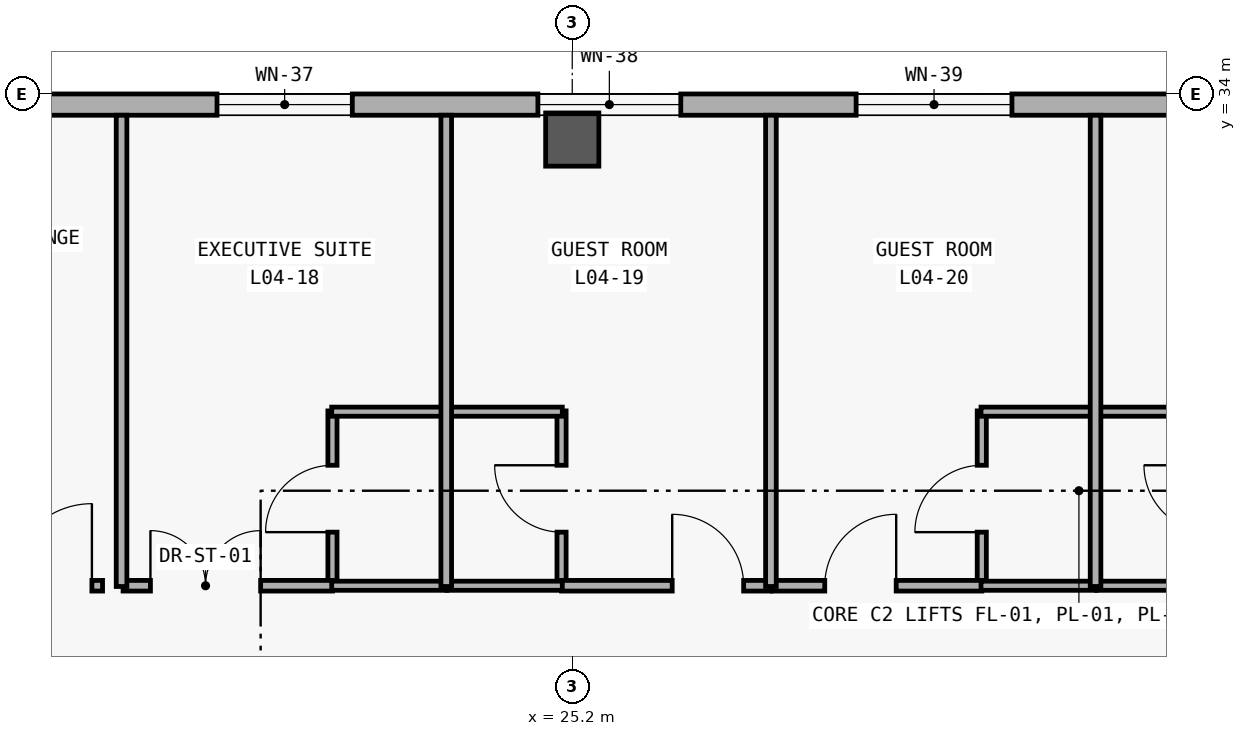
"""IFC4 building model, lengths in metres.
Left out: names, types, materials, properties, quantities, classifications, styles, units other than length and angle.
Written with IfcOpenShell. Run it as: python <this file> out.ifc"""

import sys

from ifc_helpers import new_model, si_unit, direction, frame, frame_2d, origin, origin_2d, place, context, subcontext, project, spatial, rectangle, extrude, element, fill, save


model = new_model("IFC4")
c1 = context("Model", 3, precision=1e-05, world=origin(), true_north=direction((0.0, 1.0)))
c2 = subcontext(c1, "Body", "Model", "MODEL_VIEW")
j1 = project(units=[si_unit("LENGTHUNIT", "METRE"), si_unit("PLANEANGLEUNIT", "RADIAN")], contexts=[c1])
p1 = place(None, origin())
s1 = spatial("IfcSite", under=j1, at=p1, CompositionType="ELEMENT")
p2 = place(p1, origin())
s2 = spatial("IfcBuilding", under=s1, at=p2, CompositionType="ELEMENT")
p3 = place(p2, frame((0.0, 0.0, 19.2)))
s3 = spatial("IfcBuildingStorey", under=s2, at=p3, CompositionType="ELEMENT", Elevation=19.2)
p4 = place(p3, frame((25.2, 33.4, 0.0), z_axis=(0.0, 0.0, 1.0), x_axis=(1.0, 0.0, 0.0)))
e1 = element("IfcColumn", 1, at=p4, inside=s3, PredefinedType="COLUMN", context=c2, shape_type="SweptSolid", body=[
    extrude(rectangle(XDim=0.7, YDim=0.7, at=origin_2d()), origin(), (0.0, 0.0, 1.0), 3.6),
])
p5 = place(p3, frame((8.68, 33.86, 0.0), z_axis=(0.0, 0.0, 1.0), x_axis=(1.0, 0.0, 0.0)))
e2 = element("IfcWall", 2, at=p5, inside=s3, PredefinedType="SOLIDWALL", context=c2, shape_type="SweptSolid", body=[
    extrude(rectangle(XDim=83.44, YDim=0.28, at=frame_2d((41.72, 0.0))), origin(), (0.0, 0.0, 1.0), 3.32),
])
p6 = place(p5, frame((4.745, 0.0, 0.85)))
e3 = element("IfcOpeningElement", 3, at=p6, cuts=e2, PredefinedType="OPENING", context=c2, shape_type="SweptSolid", body=[
    extrude(rectangle(XDim=1.25, YDim=1.45, at=frame_2d((0.625, 0.725))), frame((0.0, 0.15, 0.0), z_axis=(0.0, -1.0, 0.0), x_axis=(1.0, 0.0, 0.0)), (0.0, 0.0, 1.0), 0.3),
])
p7 = place(p5, frame((11.846, 0.0, 0.85)))
e4 = element("IfcOpeningElement", 4, at=p7, cuts=e2, PredefinedType="OPENING", context=c2, shape_type="SweptSolid", body=[
    extrude(rectangle(XDim=1.78, YDim=1.95, at=frame_2d((0.89, 0.975))), frame((0.0, 0.15, 0.0), z_axis=(0.0, -1.0, 0.0), x_axis=(1.0, 0.0, 0.0)), (0.0, 0.0, 1.0), 0.3),
])
p8 = place(p5, frame((16.068, 0.0, 0.85)))
e5 = element("IfcOpeningElement", 5, at=p8, cuts=e2, PredefinedType="OPENING", context=c2, shape_type="SweptSolid", body=[
    extrude(rectangle(XDim=1.88, YDim=1.95, at=frame_2d((0.94, 0.975))), frame((0.0, 0.15, 0.0), z_axis=(0.0, -1.0, 0.0), x_axis=(1.0, 0.0, 0.0)), (0.0, 0.0, 1.0), 0.3),
])
p9 = place(p5, frame((20.255, 0.0, 0.85)))
e6 = element("IfcOpeningElement", 6, at=p9, cuts=e2, PredefinedType="OPENING", context=c2, shape_type="SweptSolid", body=[
    extrude(rectangle(XDim=2.05, YDim=1.95, at=frame_2d((1.025, 0.975))), frame((0.0, 0.15, 0.0), z_axis=(0.0, -1.0, 0.0), x_axis=(1.0, 0.0, 0.0)), (0.0, 0.0, 1.0), 0.3),
])
p10 = place(p5, frame((24.461, 0.0, 0.85)))
e7 = element("IfcOpeningElement", 7, at=p10, cuts=e2, PredefinedType="OPENING", context=c2, shape_type="SweptSolid", body=[
    extrude(rectangle(XDim=2.18, YDim=1.95, at=frame_2d((1.09, 0.975))), frame((0.0, 0.15, 0.0), z_axis=(0.0, -1.0, 0.0), x_axis=(1.0, 0.0, 0.0)), (0.0, 0.0, 1.0), 0.3),
])
p11 = place(p5, frame((28.633, 0.0, 0.85)))
e8 = element("IfcOpeningElement", 8, at=p11, cuts=e2, PredefinedType="OPENING", context=c2, shape_type="SweptSolid", body=[
    extrude(rectangle(XDim=2.38, YDim=1.95, at=frame_2d((1.19, 0.975))), frame((0.0, 0.15, 0.0), z_axis=(0.0, -1.0, 0.0), x_axis=(1.0, 0.0, 0.0)), (0.0, 0.0, 1.0), 0.3),
])
p12 = place(p5, frame((32.855, 0.0, 0.85)))
e9 = element("IfcOpeningElement", 9, at=p12, cuts=e2, PredefinedType="OPENING", context=c2, shape_type="SweptSolid", body=[
    extrude(rectangle(XDim=2.48, YDim=2.0, at=frame_2d((1.24, 1.0))), frame((0.0, 0.15, 0.0), z_axis=(0.0, -1.0, 0.0), x_axis=(1.0, 0.0, 0.0)), (0.0, 0.0, 1.0), 0.3),
])
p13 = place(p5, frame((37.041, 0.0, 0.85)))
e10 = element("IfcOpeningElement", 10, at=p13, cuts=e2, PredefinedType="OPENING", context=c2, shape_type="SweptSolid", body=[
    extrude(rectangle(XDim=2.65, YDim=2.0, at=frame_2d((1.325, 1.0))), frame((0.0, 0.15, 0.0), z_axis=(0.0, -1.0, 0.0), x_axis=(1.0, 0.0, 0.0)), (0.0, 0.0, 1.0), 0.3),
])
p14 = place(p5, frame((41.163, 0.0, 0.85)))
e11 = element("IfcOpeningElement", 11, at=p14, cuts=e2, PredefinedType="OPENING", context=c2, shape_type="SweptSolid", body=[
    extrude(rectangle(XDim=2.95, YDim=2.05, at=frame_2d((1.475, 1.025))), frame((0.0, 0.15, 0.0), z_axis=(0.0, -1.0, 0.0), x_axis=(1.0, 0.0, 0.0)), (0.0, 0.0, 1.0), 0.3),
])
p15 = place(p5, frame((45.21, 0.0, 0.85)))
e12 = element("IfcOpeningElement", 12, at=p15, cuts=e2, PredefinedType="OPENING", context=c2, shape_type="SweptSolid", body=[
    extrude(rectangle(XDim=3.4, YDim=2.1, at=frame_2d((1.7, 1.05))), frame((0.0, 0.15, 0.0), z_axis=(0.0, -1.0, 0.0), x_axis=(1.0, 0.0, 0.0)), (0.0, 0.0, 1.0), 0.3),
])
p16 = place(p5, frame((50.282, 0.0, 0.85)))
e13 = element("IfcOpeningElement", 13, at=p16, cuts=e2, PredefinedType="OPENING", context=c2, shape_type="SweptSolid", body=[
    extrude(rectangle(XDim=1.8, YDim=1.8, at=frame_2d((0.9, 0.9))), frame((0.0, 0.15, 0.0), z_axis=(0.0, -1.0, 0.0), x_axis=(1.0, 0.0, 0.0)), (0.0, 0.0, 1.0), 0.3),
])
p17 = place(p5, frame((54.404, 0.0, 0.85)))
e14 = element("IfcOpeningElement", 14, at=p17, cuts=e2, PredefinedType="OPENING", context=c2, shape_type="SweptSolid", body=[
    extrude(rectangle(XDim=2.1, YDim=1.8, at=frame_2d((1.05, 0.9))), frame((0.0, 0.15, 0.0), z_axis=(0.0, -1.0, 0.0), x_axis=(1.0, 0.0, 0.0)), (0.0, 0.0, 1.0), 0.3),
])
p18 = place(p5, frame((58.525, 0.0, 0.85)))
e15 = element("IfcOpeningElement", 15, at=p18, cuts=e2, PredefinedType="OPENING", context=c2, shape_type="SweptSolid", body=[
    extrude(rectangle(XDim=2.4, YDim=1.8, at=frame_2d((1.2, 0.9))), frame((0.0, 0.15, 0.0), z_axis=(0.0, -1.0, 0.0), x_axis=(1.0, 0.0, 0.0)), (0.0, 0.0, 1.0), 0.3),
])
p19 = place(p5, frame((62.647, 0.0, 0.85)))
e16 = element("IfcOpeningElement", 16, at=p19, cuts=e2, PredefinedType="OPENING", context=c2, shape_type="SweptSolid", body=[
    extrude(rectangle(XDim=2.7, YDim=1.85, at=frame_2d((1.35, 0.925))), frame((0.0, 0.15, 0.0), z_axis=(0.0, -1.0, 0.0), x_axis=(1.0, 0.0, 0.0)), (0.0, 0.0, 1.0), 0.3),
])
p20 = place(p5, frame((66.769, 0.0, 0.85)))
e17 = element("IfcOpeningElement", 17, at=p20, cuts=e2, PredefinedType="OPENING", context=c2, shape_type="SweptSolid", body=[
    extrude(rectangle(XDim=3.0, YDim=1.9, at=frame_2d((1.5, 0.95))), frame((0.0, 0.15, 0.0), z_axis=(0.0, -1.0, 0.0), x_axis=(1.0, 0.0, 0.0)), (0.0, 0.0, 1.0), 0.3),
])
p21 = place(p5, frame((71.791, 0.0, 0.85)))
e18 = element("IfcOpeningElement", 18, at=p21, cuts=e2, PredefinedType="OPENING", context=c2, shape_type="SweptSolid", body=[
    extrude(rectangle(XDim=1.5, YDim=1.75, at=frame_2d((0.75, 0.875))), frame((0.0, 0.15, 0.0), z_axis=(0.0, -1.0, 0.0), x_axis=(1.0, 0.0, 0.0)), (0.0, 0.0, 1.0), 0.3),
])
p22 = place(p5, frame((75.987, 0.0, 0.85)))
e19 = element("IfcOpeningElement", 19, at=p22, cuts=e2, PredefinedType="OPENING", context=c2, shape_type="SweptSolid", body=[
    extrude(rectangle(XDim=1.65, YDim=1.75, at=frame_2d((0.825, 0.875))), frame((0.0, 0.15, 0.0), z_axis=(0.0, -1.0, 0.0), x_axis=(1.0, 0.0, 0.0)), (0.0, 0.0, 1.0), 0.3),
])
p23 = place(p5, frame((80.109, 0.0, 0.85)))
e20 = element("IfcOpeningElement", 20, at=p23, cuts=e2, PredefinedType="OPENING", context=c2, shape_type="SweptSolid", body=[
    extrude(rectangle(XDim=1.95, YDim=1.75, at=frame_2d((0.975, 0.875))), frame((0.0, 0.15, 0.0), z_axis=(0.0, -1.0, 0.0), x_axis=(1.0, 0.0, 0.0)), (0.0, 0.0, 1.0), 0.3),
])
p24 = place(p3, frame((22.045, 27.52, 0.0), z_axis=(0.0, 0.0, 1.0), x_axis=(0.0, 1.0, 0.0)))
e21 = element("IfcWall", 21, at=p24, inside=s3, PredefinedType="PARTITIONING", context=c2, shape_type="SweptSolid", body=[
    extrude(rectangle(XDim=2.31, YDim=0.12, at=frame_2d((1.155, 0.0))), origin(), (0.0, 0.0, 1.0), 2.48),
])
p25 = place(p24, frame((0.715, 0.0, 0.0)))
e22 = element("IfcOpeningElement", 22, at=p25, cuts=e21, PredefinedType="OPENING", context=c2, shape_type="SweptSolid", body=[
    extrude(rectangle(XDim=0.88, YDim=2.15, at=frame_2d((0.44, 1.075))), frame((0.0, 0.07, 0.0), z_axis=(0.0, -1.0, 0.0), x_axis=(1.0, 0.0, 0.0)), (0.0, 0.0, 1.0), 0.14),
])
p26 = place(p3, frame((25.059, 27.52, 0.0), z_axis=(0.0, 0.0, 1.0), x_axis=(0.0, 1.0, 0.0)))
e23 = element("IfcWall", 23, at=p26, inside=s3, PredefinedType="PARTITIONING", context=c2, shape_type="SweptSolid", body=[
    extrude(rectangle(XDim=2.31, YDim=0.12, at=frame_2d((1.155, 0.0))), origin(), (0.0, 0.0, 1.0), 2.48),
])
p27 = place(p26, frame((0.715, 0.0, 0.0)))
e24 = element("IfcOpeningElement", 24, at=p27, cuts=e23, PredefinedType="OPENING", context=c2, shape_type="SweptSolid", body=[
    extrude(rectangle(XDim=0.88, YDim=2.15, at=frame_2d((0.44, 1.075))), frame((0.0, 0.07, 0.0), z_axis=(0.0, -1.0, 0.0), x_axis=(1.0, 0.0, 0.0)), (0.0, 0.0, 1.0), 0.14),
])
p28 = place(p3, frame((30.588, 27.52, 0.0), z_axis=(0.0, 0.0, 1.0), x_axis=(0.0, 1.0, 0.0)))
e25 = element("IfcWall", 25, at=p28, inside=s3, PredefinedType="PARTITIONING", context=c2, shape_type="SweptSolid", body=[
    extrude(rectangle(XDim=2.31, YDim=0.12, at=frame_2d((1.155, 0.0))), origin(), (0.0, 0.0, 1.0), 2.48),
])
p29 = place(p28, frame((0.715, 0.0, 0.0)))
e26 = element("IfcOpeningElement", 26, at=p29, cuts=e25, PredefinedType="OPENING", context=c2, shape_type="SweptSolid", body=[
    extrude(rectangle(XDim=0.88, YDim=2.15, at=frame_2d((0.44, 1.075))), frame((0.0, 0.07, 0.0), z_axis=(0.0, -1.0, 0.0), x_axis=(1.0, 0.0, 0.0)), (0.0, 0.0, 1.0), 0.14),
])
p30 = place(p3, frame((16.96, 27.53, 0.0), z_axis=(0.0, 0.0, 1.0), x_axis=(1.0, 0.0, 0.0)))
e27 = element("IfcWall", 27, at=p30, inside=s3, PredefinedType="PARTITIONING", context=c2, shape_type="SweptSolid", body=[
    extrude(rectangle(XDim=2.06, YDim=0.14, at=frame_2d((1.03, 0.0))), origin(), (0.0, 0.0, 1.0), 2.48),
])
p31 = place(p30, frame((0.84, 0.0, 0.0)))
e28 = element("IfcOpeningElement", 28, at=p31, cuts=e27, PredefinedType="OPENING", context=c2, shape_type="SweptSolid", body=[
    extrude(rectangle(XDim=1.08, YDim=2.25, at=frame_2d((0.54, 1.125))), frame((0.0, 0.08, 0.0), z_axis=(0.0, -1.0, 0.0), x_axis=(1.0, 0.0, 0.0)), (0.0, 0.0, 1.0), 0.16),
])
p32 = place(p3, frame((19.29, 27.53, 0.0), z_axis=(0.0, 0.0, 1.0), x_axis=(1.0, 0.0, 0.0)))
e29 = element("IfcWall", 29, at=p32, inside=s3, PredefinedType="PARTITIONING", context=c2, shape_type="SweptSolid", body=[
    extrude(rectangle(XDim=2.755, YDim=0.14, at=frame_2d((1.377, 0.0))), origin(), (0.0, 0.0, 1.0), 2.48),
])
p33 = place(p32, frame((0.36, 0.0, 0.0)))
e30 = element("IfcOpeningElement", 30, at=p33, cuts=e29, PredefinedType="OPENING", context=c2, shape_type="SweptSolid", body=[
    extrude(rectangle(XDim=1.45, YDim=2.3, at=frame_2d((0.725, 1.15))), frame((0.0, 0.08, 0.0), z_axis=(0.0, -1.0, 0.0), x_axis=(1.0, 0.0, 0.0)), (0.0, 0.0, 1.0), 0.16),
])
p34 = place(p3, frame((25.059, 27.53, 0.0), z_axis=(0.0, 0.0, 1.0), x_axis=(1.0, 0.0, 0.0)))
e31 = element("IfcWall", 31, at=p34, inside=s3, PredefinedType="PARTITIONING", context=c2, shape_type="SweptSolid", body=[
    extrude(rectangle(XDim=2.755, YDim=0.14, at=frame_2d((1.377, 0.0))), origin(), (0.0, 0.0, 1.0), 2.48),
])
p35 = place(p34, frame((1.456, 0.0, 0.0)))
e32 = element("IfcOpeningElement", 32, at=p35, cuts=e31, PredefinedType="OPENING", context=c2, shape_type="SweptSolid", body=[
    extrude(rectangle(XDim=0.94, YDim=2.2, at=frame_2d((0.47, 1.1))), frame((0.0, 0.08, 0.0), z_axis=(0.0, -1.0, 0.0), x_axis=(1.0, 0.0, 0.0)), (0.0, 0.0, 1.0), 0.16),
])
p36 = place(p3, frame((27.834, 27.53, 0.0), z_axis=(0.0, 0.0, 1.0), x_axis=(1.0, 0.0, 0.0)))
e33 = element("IfcWall", 33, at=p36, inside=s3, PredefinedType="PARTITIONING", context=c2, shape_type="SweptSolid", body=[
    extrude(rectangle(XDim=2.754, YDim=0.14, at=frame_2d((1.377, 0.0))), origin(), (0.0, 0.0, 1.0), 2.48),
])
p37 = place(p36, frame((0.688, 0.0, 0.0)))
e34 = element("IfcOpeningElement", 34, at=p37, cuts=e33, PredefinedType="OPENING", context=c2, shape_type="SweptSolid", body=[
    extrude(rectangle(XDim=0.94, YDim=2.2, at=frame_2d((0.47, 1.1))), frame((0.0, 0.08, 0.0), z_axis=(0.0, -1.0, 0.0), x_axis=(1.0, 0.0, 0.0)), (0.0, 0.0, 1.0), 0.16),
])
for number, where, z_axis, x_axis in (
    (35, (22.035, 27.53, 0.0), (0.0, 0.0, 1.0), (1.0, 0.0, 0.0)),
    (36, (22.035, 29.82, 0.0), (0.0, 0.0, 1.0), (1.0, 0.0, 0.0)),
    (37, (23.552, 27.53, 0.0), (0.0, 0.0, 1.0), (1.0, 0.0, 0.0)),
    (38, (23.552, 29.82, 0.0), (0.0, 0.0, 1.0), (1.0, 0.0, 0.0)),
    (39, (30.578, 27.53, 0.0), (0.0, 0.0, 1.0), (1.0, 0.0, 0.0)),
    (40, (30.578, 29.82, 0.0), (0.0, 0.0, 1.0), (1.0, 0.0, 0.0)),
):
    element("IfcWall", number, at=place(p3, frame(where, z_axis=z_axis, x_axis=x_axis)), inside=s3, PredefinedType="PARTITIONING", context=c2, shape_type="SweptSolid", body=[
        extrude(rectangle(XDim=1.517, YDim=0.12, at=frame_2d((0.759, 0.0))), origin(), (0.0, 0.0, 1.0), 2.48),
    ])
p38 = place(p3, frame((32.095, 27.53, 0.0), z_axis=(0.0, 0.0, 1.0), x_axis=(1.0, 0.0, 0.0)))
e41 = element("IfcWall", 41, at=p38, inside=s3, PredefinedType="PARTITIONING", context=c2, shape_type="SweptSolid", body=[
    extrude(rectangle(XDim=1.507, YDim=0.12, at=frame_2d((0.753, 0.0))), origin(), (0.0, 0.0, 1.0), 2.48),
])
p39 = place(p3, frame((32.095, 29.82, 0.0), z_axis=(0.0, 0.0, 1.0), x_axis=(1.0, 0.0, 0.0)))
e42 = element("IfcWall", 42, at=p39, inside=s3, PredefinedType="PARTITIONING", context=c2, shape_type="SweptSolid", body=[
    extrude(rectangle(XDim=1.517, YDim=0.12, at=frame_2d((0.759, 0.0))), origin(), (0.0, 0.0, 1.0), 2.48),
])
for number, where, z_axis, x_axis in (
    (43, (19.27, 27.52, 0.0), (0.0, 0.0, 1.0), (0.0, 1.0, 0.0)),
    (44, (23.542, 27.52, 0.0), (0.0, 0.0, 1.0), (0.0, 1.0, 0.0)),
    (45, (27.814, 27.52, 0.0), (0.0, 0.0, 1.0), (0.0, 1.0, 0.0)),
    (46, (32.085, 27.52, 0.0), (0.0, 0.0, 1.0), (0.0, 1.0, 0.0)),
):
    element("IfcWall", number, at=place(p3, frame(where, z_axis=z_axis, x_axis=x_axis)), inside=s3, PredefinedType="PARTITIONING", context=c2, shape_type="SweptSolid", body=[
        extrude(rectangle(XDim=6.2, YDim=0.14, at=frame_2d((3.1, 0.0))), origin(), (0.0, 0.0, 1.0), 2.48),
    ])
p40 = place(p7, origin())
e47 = element("IfcWindow", 47, at=p40, inside=s3, PartitioningType="SINGLE_PANEL", PredefinedType="WINDOW", context=c2, shape_type="SweptSolid", body=[
    extrude(rectangle(XDim=1.78, YDim=1.95, at=frame_2d((0.89, 0.975))), frame((0.0, 0.03, 0.0), z_axis=(0.0, -1.0, 0.0), x_axis=(1.0, 0.0, 0.0)), (0.0, 0.0, 1.0), 0.06),
])
fill(e4, e47)
p41 = place(p8, origin())
e48 = element("IfcWindow", 48, at=p41, inside=s3, PartitioningType="SINGLE_PANEL", PredefinedType="WINDOW", context=c2, shape_type="SweptSolid", body=[
    extrude(rectangle(XDim=1.88, YDim=1.95, at=frame_2d((0.94, 0.975))), frame((0.0, 0.03, 0.0), z_axis=(0.0, -1.0, 0.0), x_axis=(1.0, 0.0, 0.0)), (0.0, 0.0, 1.0), 0.06),
])
fill(e5, e48)
p42 = place(p9, origin())
e49 = element("IfcWindow", 49, at=p42, inside=s3, PartitioningType="SINGLE_PANEL", PredefinedType="WINDOW", context=c2, shape_type="SweptSolid", body=[
    extrude(rectangle(XDim=2.05, YDim=1.95, at=frame_2d((1.025, 0.975))), frame((0.0, 0.03, 0.0), z_axis=(0.0, -1.0, 0.0), x_axis=(1.0, 0.0, 0.0)), (0.0, 0.0, 1.0), 0.06),
])
fill(e6, e49)
p43 = place(p25, origin())
e50 = element("IfcDoor", 50, at=p43, inside=s3, OperationType="SINGLE_SWING_LEFT", PredefinedType="DOOR", context=c2, shape_type="SweptSolid", body=[
    extrude(rectangle(XDim=0.88, YDim=2.15, at=frame_2d((0.44, 1.075))), frame((0.0, 0.025, 0.0), z_axis=(0.0, -1.0, 0.0), x_axis=(1.0, 0.0, 0.0)), (0.0, 0.0, 1.0), 0.05),
])
fill(e22, e50)
p44 = place(p27, origin())
e51 = element("IfcDoor", 51, at=p44, inside=s3, OperationType="SINGLE_SWING_RIGHT", PredefinedType="DOOR", context=c2, shape_type="SweptSolid", body=[
    extrude(rectangle(XDim=0.88, YDim=2.15, at=frame_2d((0.44, 1.075))), frame((0.0, 0.025, 0.0), z_axis=(0.0, -1.0, 0.0), x_axis=(1.0, 0.0, 0.0)), (0.0, 0.0, 1.0), 0.05),
])
fill(e24, e51)
p45 = place(p29, origin())
e52 = element("IfcDoor", 52, at=p45, inside=s3, OperationType="SINGLE_SWING_LEFT", PredefinedType="DOOR", context=c2, shape_type="SweptSolid", body=[
    extrude(rectangle(XDim=0.88, YDim=2.15, at=frame_2d((0.44, 1.075))), frame((0.0, 0.025, 0.0), z_axis=(0.0, -1.0, 0.0), x_axis=(1.0, 0.0, 0.0)), (0.0, 0.0, 1.0), 0.05),
])
fill(e26, e52)
p46 = place(p31, origin())
e53 = element("IfcDoor", 53, at=p46, inside=s3, OperationType="SINGLE_SWING_RIGHT", PredefinedType="DOOR", context=c2, shape_type="SweptSolid", body=[
    extrude(rectangle(XDim=1.08, YDim=2.25, at=frame_2d((0.54, 1.125))), frame((0.0, 0.025, 0.0), z_axis=(0.0, -1.0, 0.0), x_axis=(1.0, 0.0, 0.0)), (0.0, 0.0, 1.0), 0.05),
])
fill(e28, e53)
p47 = place(p33, origin())
e54 = element("IfcDoor", 54, at=p47, inside=s3, OperationType="DOUBLE_DOOR_SINGLE_SWING", PredefinedType="DOOR", context=c2, shape_type="SweptSolid", body=[
    extrude(rectangle(XDim=1.45, YDim=2.3, at=frame_2d((0.725, 1.15))), frame((0.0, 0.025, 0.0), z_axis=(0.0, -1.0, 0.0), x_axis=(1.0, 0.0, 0.0)), (0.0, 0.0, 1.0), 0.05),
])
fill(e30, e54)
p48 = place(p35, origin())
e55 = element("IfcDoor", 55, at=p48, inside=s3, OperationType="SINGLE_SWING_LEFT", PredefinedType="DOOR", context=c2, shape_type="SweptSolid", body=[
    extrude(rectangle(XDim=0.94, YDim=2.2, at=frame_2d((0.47, 1.1))), frame((0.0, 0.025, 0.0), z_axis=(0.0, -1.0, 0.0), x_axis=(1.0, 0.0, 0.0)), (0.0, 0.0, 1.0), 0.05),
])
fill(e32, e55)
p49 = place(p37, origin())
e56 = element("IfcDoor", 56, at=p49, inside=s3, OperationType="SINGLE_SWING_RIGHT", PredefinedType="DOOR", context=c2, shape_type="SweptSolid", body=[
    extrude(rectangle(XDim=0.94, YDim=2.2, at=frame_2d((0.47, 1.1))), frame((0.0, 0.025, 0.0), z_axis=(0.0, -1.0, 0.0), x_axis=(1.0, 0.0, 0.0)), (0.0, 0.0, 1.0), 0.05),
])
fill(e34, e56)
save(model, sys.argv[1])
